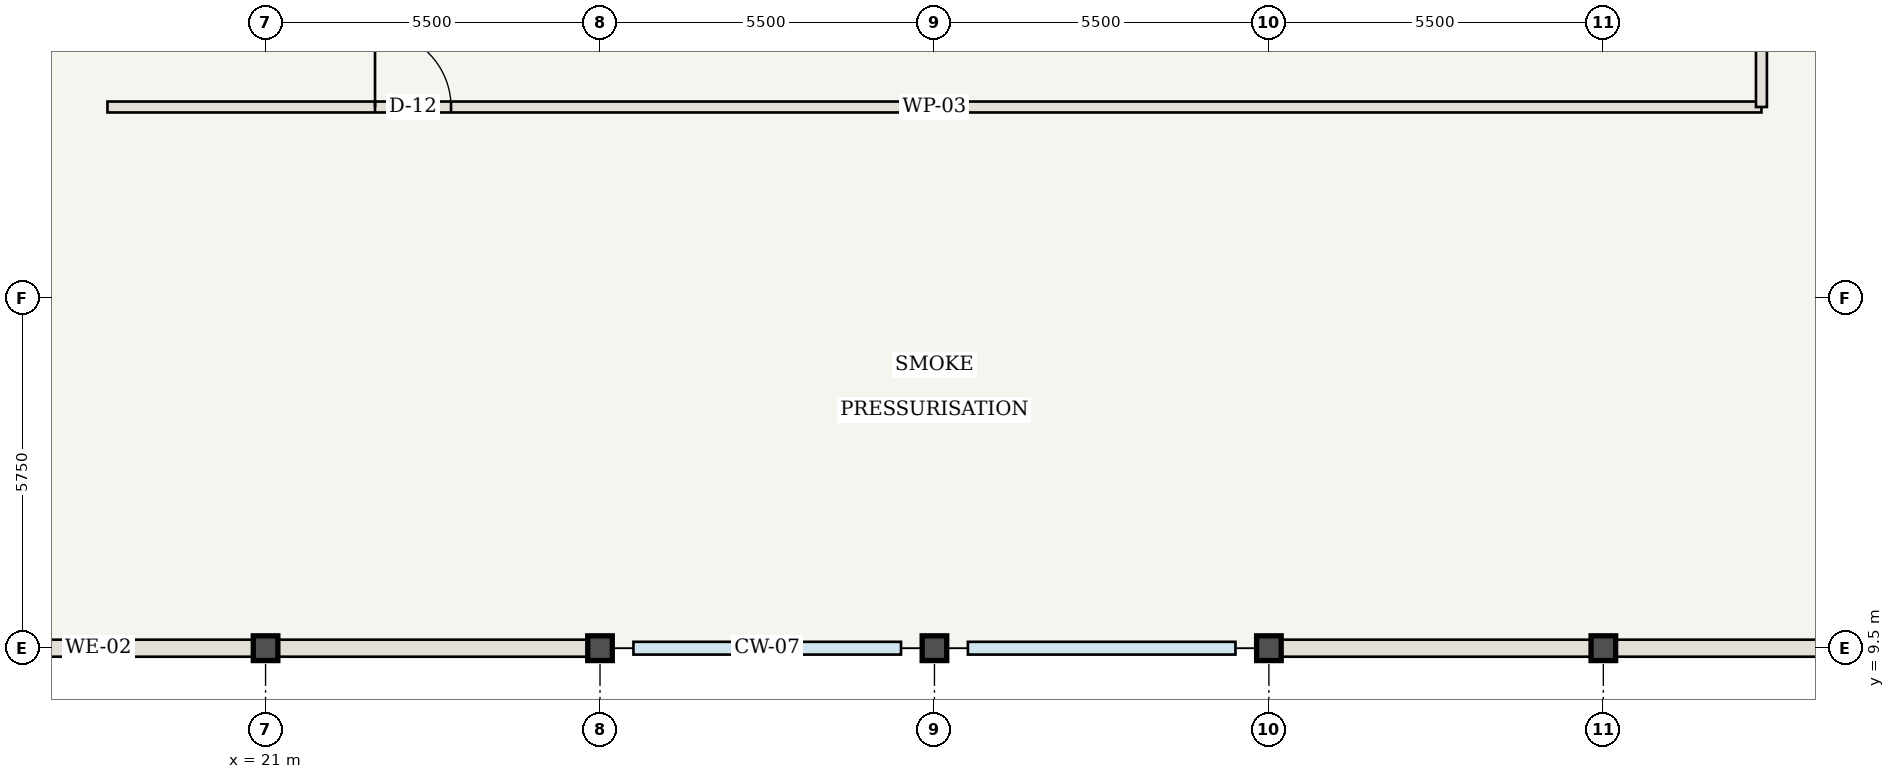
"""IFC4 building model, lengths in metres.
Left out: names, types, materials, properties, quantities, classifications, styles, units other than length and angle.
Written with IfcOpenShell. Run it as: python <this file> out.ifc"""

import sys

from ifc_helpers import new_model, si_unit, direction, frame, frame_2d, origin, origin_2d, place, context, subcontext, project, spatial, rectangle, i_section, extrude, element, fill, save


model = new_model("IFC4")
c1 = context("Model", 3, precision=1e-05, world=origin(), true_north=direction((0.0, 1.0)))
c2 = subcontext(c1, "Body", "Model", "MODEL_VIEW")
j1 = project(units=[si_unit("LENGTHUNIT", "METRE"), si_unit("PLANEANGLEUNIT", "RADIAN")], contexts=[c1])
p1 = place(None, origin())
s1 = spatial("IfcSite", under=j1, at=p1, CompositionType="ELEMENT")
p2 = place(p1, origin())
s2 = spatial("IfcBuilding", under=s1, at=p2, CompositionType="ELEMENT")
p3 = place(p2, frame((0.0, 0.0, 322.35)))
s3 = spatial("IfcBuildingStorey", under=s2, at=p3, CompositionType="ELEMENT", Elevation=322.35)
for number, where, z_axis, x_axis in (
    (1, (21.0, 9.5, 0.0), (0.0, 0.0, 1.0), (1.0, 0.0, 0.0)),
    (2, (26.5, 9.5, 0.0), (0.0, 0.0, 1.0), (1.0, 0.0, 0.0)),
    (3, (32.0, 9.5, 0.0), (0.0, 0.0, 1.0), (1.0, 0.0, 0.0)),
    (4, (37.5, 9.5, 0.0), (0.0, 0.0, 1.0), (1.0, 0.0, 0.0)),
    (5, (43.0, 9.5, 0.0), (0.0, 0.0, 1.0), (1.0, 0.0, 0.0)),
):
    element("IfcColumn", number, at=place(p3, frame(where, z_axis=z_axis, x_axis=x_axis)), inside=s3, PredefinedType="COLUMN", context=c2, shape_type="SweptSolid", body=[
        extrude(i_section(OverallWidth=0.404, OverallDepth=0.407, WebThickness=0.027, FlangeThickness=0.044, at=origin_2d()), origin(), (0.0, 0.0, 1.0), 4.55),
    ])
p4 = place(p3, frame((18.4, 18.4, 0.0), z_axis=(0.0, 0.0, 1.0), x_axis=(1.0, 0.0, 0.0)))
e6 = element("IfcWall", 6, at=p4, inside=s3, PredefinedType="STANDARD", context=c2, shape_type="SweptSolid", body=[
    extrude(rectangle(XDim=27.2, YDim=0.18, at=frame_2d((13.6, 0.0))), origin(), (0.0, 0.0, 1.0), 4.29),
])
p5 = place(p4, frame((4.4, 0.0, 0.0)))
e7 = element("IfcOpeningElement", 7, at=p5, cuts=e6, PredefinedType="OPENING", context=c2, shape_type="SweptSolid", body=[
    extrude(rectangle(XDim=1.25, YDim=2.2, at=frame_2d((0.625, 1.1))), frame((0.0, 0.1, 0.0), z_axis=(0.0, -1.0, 0.0), x_axis=(1.0, 0.0, 0.0)), (0.0, 0.0, 1.0), 0.2),
])
p6 = place(p3, frame((45.6, 18.4, 0.0), z_axis=(0.0, 0.0, 1.0), x_axis=(0.0, 1.0, 0.0)))
e8 = element("IfcWall", 8, at=p6, inside=s3, PredefinedType="STANDARD", context=c2, shape_type="SweptSolid", body=[
    extrude(rectangle(XDim=27.2, YDim=0.18, at=frame_2d((13.6, 0.0))), origin(), (0.0, 0.0, 1.0), 4.29),
])
p7 = place(p6, frame((14.55, 0.0, 0.0)))
e9 = element("IfcOpeningElement", 9, at=p7, cuts=e8, PredefinedType="OPENING", context=c2, shape_type="SweptSolid", body=[
    extrude(rectangle(XDim=1.25, YDim=2.2, at=frame_2d((0.625, 1.1))), frame((0.0, 0.1, 0.0), z_axis=(0.0, -1.0, 0.0), x_axis=(1.0, 0.0, 0.0)), (0.0, 0.0, 1.0), 0.2),
])
for number, where, z_axis, x_axis in (
    (10, (21.0, 9.5, 0.0), (0.0, 0.0, 1.0), (-1.0, 0.0, 0.0)),
    (11, (26.5, 9.5, 0.0), (0.0, 0.0, 1.0), (-1.0, 0.0, 0.0)),
    (12, (43.0, 9.5, 0.0), (0.0, 0.0, 1.0), (-1.0, 0.0, 0.0)),
    (13, (48.5, 9.5, 0.0), (0.0, 0.0, 1.0), (-1.0, 0.0, 0.0)),
):
    element("IfcWall", number, at=place(p3, frame(where, z_axis=z_axis, x_axis=x_axis)), inside=s3, PredefinedType="USERDEFINED", context=c2, shape_type="SweptSolid", body=[
        extrude(rectangle(XDim=5.5, YDim=0.28, at=frame_2d((2.75, 0.0))), origin(), (0.0, 0.0, 1.0), 3.57),
    ])
p8 = place(p5, origin())
e14 = element("IfcDoor", 14, at=p8, inside=s3, OperationType="SINGLE_SWING_LEFT", PredefinedType="DOOR", context=c2, shape_type="SweptSolid", body=[
    extrude(rectangle(XDim=1.25, YDim=2.2, at=frame_2d((0.625, 1.1))), frame((0.0, 0.025, 0.0), z_axis=(0.0, -1.0, 0.0), x_axis=(1.0, 0.0, 0.0)), (0.0, 0.0, 1.0), 0.05),
])
fill(e7, e14)
save(model, sys.argv[1])
